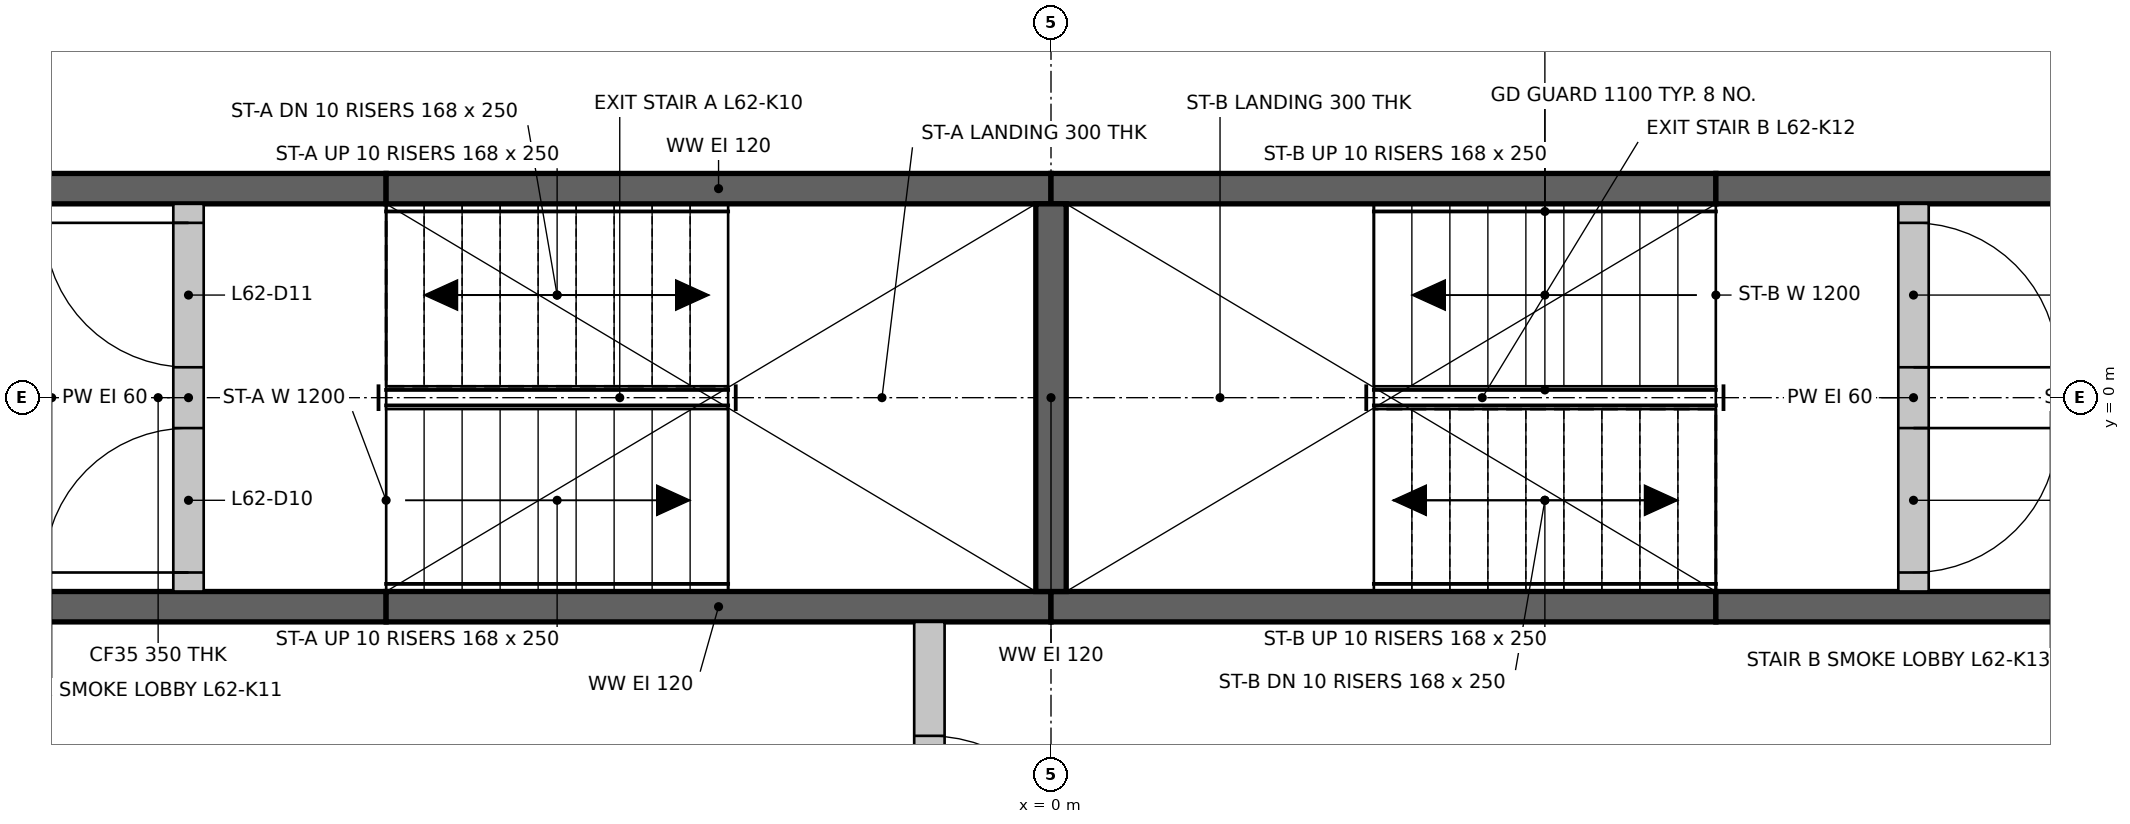
"""IFC4 building model, lengths in metres.
Left out: names, types, materials, properties, quantities, classifications, styles, units other than length and angle.
Written with IfcOpenShell. Run it as: python <this file> out.ifc"""

import sys

from ifc_helpers import new_model, si_unit, direction, frame, frame_2d, origin, place, context, subcontext, project, spatial, rectangle, extrude, element, fill, save


model = new_model("IFC4")
c1 = context("Model", 3, precision=1e-05, world=origin(), true_north=direction((0.0, 1.0)))
c2 = subcontext(c1, "Body", "Model", "MODEL_VIEW")
j1 = project(units=[si_unit("LENGTHUNIT", "METRE"), si_unit("PLANEANGLEUNIT", "RADIAN")], contexts=[c1])
p1 = place(None, origin())
s1 = spatial("IfcSite", under=j1, at=p1, CompositionType="ELEMENT")
p2 = place(p1, origin())
s2 = spatial("IfcBuilding", under=s1, at=p2, CompositionType="ELEMENT")
p3 = place(p2, frame((0.0, 0.0, 227.85)))
s3 = spatial("IfcBuildingStorey", under=s2, at=p3, CompositionType="ELEMENT", Elevation=227.85)
p4 = place(p3, frame((-7.374, -1.375, 0.0), z_axis=(0.0, 0.0, 1.0), x_axis=(1.0, 0.0, 0.0)))
e1 = element("IfcWall", 1, at=p4, inside=s3, PredefinedType="SHEAR", context=c2, shape_type="SweptSolid", body=[
    extrude(rectangle(XDim=3.0, YDim=0.2, at=frame_2d((1.5, 0.0))), origin(), (0.0, 0.0, 1.0), 3.0),
])
for number, where, z_axis, x_axis in (
    (2, (-4.374, -1.375, 0.0), (0.0, 0.0, 1.0), (1.0, 0.0, 0.0)),
    (3, (0.0, -1.375, 0.0), (0.0, 0.0, 1.0), (1.0, 0.0, 0.0)),
):
    element("IfcWall", number, at=place(p3, frame(where, z_axis=z_axis, x_axis=x_axis)), inside=s3, PredefinedType="SHEAR", context=c2, shape_type="SweptSolid", body=[
        extrude(rectangle(XDim=4.374, YDim=0.2, at=frame_2d((2.187, 0.0))), origin(), (0.0, 0.0, 1.0), 3.0),
    ])
for number, where, z_axis, x_axis in (
    (4, (4.374, -1.375, 0.0), (0.0, 0.0, 1.0), (1.0, 0.0, 0.0)),
    (5, (-7.374, 1.375, 0.0), (0.0, 0.0, 1.0), (1.0, 0.0, 0.0)),
):
    element("IfcWall", number, at=place(p3, frame(where, z_axis=z_axis, x_axis=x_axis)), inside=s3, PredefinedType="SHEAR", context=c2, shape_type="SweptSolid", body=[
        extrude(rectangle(XDim=3.0, YDim=0.2, at=frame_2d((1.5, 0.0))), origin(), (0.0, 0.0, 1.0), 3.0),
    ])
for number, where, z_axis, x_axis in (
    (6, (-4.374, 1.375, 0.0), (0.0, 0.0, 1.0), (1.0, 0.0, 0.0)),
    (7, (0.0, 1.375, 0.0), (0.0, 0.0, 1.0), (1.0, 0.0, 0.0)),
):
    element("IfcWall", number, at=place(p3, frame(where, z_axis=z_axis, x_axis=x_axis)), inside=s3, PredefinedType="SHEAR", context=c2, shape_type="SweptSolid", body=[
        extrude(rectangle(XDim=4.374, YDim=0.2, at=frame_2d((2.187, 0.0))), origin(), (0.0, 0.0, 1.0), 3.0),
    ])
p5 = place(p3, frame((4.374, 1.375, 0.0), z_axis=(0.0, 0.0, 1.0), x_axis=(1.0, 0.0, 0.0)))
e8 = element("IfcWall", 8, at=p5, inside=s3, PredefinedType="SHEAR", context=c2, shape_type="SweptSolid", body=[
    extrude(rectangle(XDim=3.0, YDim=0.2, at=frame_2d((1.5, 0.0))), origin(), (0.0, 0.0, 1.0), 3.0),
])
p6 = place(p3, frame((0.0, -1.275, 0.0), z_axis=(0.0, 0.0, 1.0), x_axis=(0.0, 1.0, 0.0)))
e9 = element("IfcWall", 9, at=p6, inside=s3, PredefinedType="SHEAR", context=c2, shape_type="SweptSolid", body=[
    extrude(rectangle(XDim=2.55, YDim=0.2, at=frame_2d((1.275, 0.0))), origin(), (0.0, 0.0, 1.0), 3.0),
])
p7 = place(p3, frame((-0.8, -3.974, 0.0), z_axis=(0.0, 0.0, 1.0), x_axis=(0.0, 1.0, 0.0)))
e10 = element("IfcWall", 10, at=p7, inside=s3, PredefinedType="PARTITIONING", context=c2, shape_type="SweptSolid", body=[
    extrude(rectangle(XDim=2.499, YDim=0.2, at=frame_2d((1.25, 0.0))), origin(), (0.0, 0.0, 1.0), 3.0),
])
p8 = place(p7, frame((0.75, 0.0, 0.0)))
e11 = element("IfcOpeningElement", 11, at=p8, cuts=e10, PredefinedType="OPENING", context=c2, shape_type="SweptSolid", body=[
    extrude(rectangle(XDim=1.0, YDim=2.1, at=frame_2d((0.5, 1.05))), frame((0.0, 0.11, 0.0), z_axis=(0.0, -1.0, 0.0), x_axis=(1.0, 0.0, 0.0)), (0.0, 0.0, 1.0), 0.22),
])
p9 = place(p3, frame((-5.674, -1.275, 0.0), z_axis=(0.0, 0.0, 1.0), x_axis=(0.0, 1.0, 0.0)))
e12 = element("IfcWall", 12, at=p9, inside=s3, PredefinedType="PARTITIONING", context=c2, shape_type="SweptSolid", body=[
    extrude(rectangle(XDim=2.55, YDim=0.2, at=frame_2d((1.275, 0.0))), origin(), (0.0, 0.0, 1.0), 3.0),
])
p10 = place(p9, frame((0.125, 0.0, 0.0)))
e13 = element("IfcOpeningElement", 13, at=p10, cuts=e12, PredefinedType="OPENING", context=c2, shape_type="SweptSolid", body=[
    extrude(rectangle(XDim=0.95, YDim=2.1, at=frame_2d((0.475, 1.05))), frame((0.0, 0.11, 0.0), z_axis=(0.0, -1.0, 0.0), x_axis=(1.0, 0.0, 0.0)), (0.0, 0.0, 1.0), 0.22),
])
p11 = place(p9, frame((1.475, 0.0, 0.0)))
e14 = element("IfcOpeningElement", 14, at=p11, cuts=e12, PredefinedType="OPENING", context=c2, shape_type="SweptSolid", body=[
    extrude(rectangle(XDim=0.95, YDim=2.1, at=frame_2d((0.475, 1.05))), frame((0.0, 0.11, 0.0), z_axis=(0.0, -1.0, 0.0), x_axis=(1.0, 0.0, 0.0)), (0.0, 0.0, 1.0), 0.22),
])
p12 = place(p3, frame((5.674, -1.275, 0.0), z_axis=(0.0, 0.0, 1.0), x_axis=(0.0, 1.0, 0.0)))
e15 = element("IfcWall", 15, at=p12, inside=s3, PredefinedType="PARTITIONING", context=c2, shape_type="SweptSolid", body=[
    extrude(rectangle(XDim=2.55, YDim=0.2, at=frame_2d((1.275, 0.0))), origin(), (0.0, 0.0, 1.0), 3.0),
])
p13 = place(p12, frame((0.125, 0.0, 0.0)))
e16 = element("IfcOpeningElement", 16, at=p13, cuts=e15, PredefinedType="OPENING", context=c2, shape_type="SweptSolid", body=[
    extrude(rectangle(XDim=0.95, YDim=2.1, at=frame_2d((0.475, 1.05))), frame((0.0, 0.11, 0.0), z_axis=(0.0, -1.0, 0.0), x_axis=(1.0, 0.0, 0.0)), (0.0, 0.0, 1.0), 0.22),
])
p14 = place(p12, frame((1.475, 0.0, 0.0)))
e17 = element("IfcOpeningElement", 17, at=p14, cuts=e15, PredefinedType="OPENING", context=c2, shape_type="SweptSolid", body=[
    extrude(rectangle(XDim=0.95, YDim=2.1, at=frame_2d((0.475, 1.05))), frame((0.0, 0.11, 0.0), z_axis=(0.0, -1.0, 0.0), x_axis=(1.0, 0.0, 0.0)), (0.0, 0.0, 1.0), 0.22),
])
p15 = place(p10, origin())
e18 = element("IfcDoor", 18, at=p15, inside=s3, OperationType="SINGLE_SWING_LEFT", PredefinedType="DOOR", context=c2, shape_type="SweptSolid", body=[
    extrude(rectangle(XDim=0.95, YDim=2.1, at=frame_2d((0.475, 1.05))), frame((0.0, 0.025, 0.0), z_axis=(0.0, -1.0, 0.0), x_axis=(1.0, 0.0, 0.0)), (0.0, 0.0, 1.0), 0.05),
])
fill(e13, e18)
p16 = place(p11, origin())
e19 = element("IfcDoor", 19, at=p16, inside=s3, OperationType="SINGLE_SWING_RIGHT", PredefinedType="DOOR", context=c2, shape_type="SweptSolid", body=[
    extrude(rectangle(XDim=0.95, YDim=2.1, at=frame_2d((0.475, 1.05))), frame((0.0, 0.025, 0.0), z_axis=(0.0, -1.0, 0.0), x_axis=(1.0, 0.0, 0.0)), (0.0, 0.0, 1.0), 0.05),
])
fill(e14, e19)
p17 = place(p13, frame((0.95, 0.0, 0.0), z_axis=(0.0, 0.0, 1.0), x_axis=(-1.0, 0.0, 0.0)))
e20 = element("IfcDoor", 20, at=p17, inside=s3, OperationType="SINGLE_SWING_RIGHT", PredefinedType="DOOR", context=c2, shape_type="SweptSolid", body=[
    extrude(rectangle(XDim=0.95, YDim=2.1, at=frame_2d((0.475, 1.05))), frame((0.0, 0.025, 0.0), z_axis=(0.0, -1.0, 0.0), x_axis=(1.0, 0.0, 0.0)), (0.0, 0.0, 1.0), 0.05),
])
fill(e16, e20)
p18 = place(p14, frame((0.95, 0.0, 0.0), z_axis=(0.0, 0.0, 1.0), x_axis=(-1.0, 0.0, 0.0)))
e21 = element("IfcDoor", 21, at=p18, inside=s3, OperationType="SINGLE_SWING_LEFT", PredefinedType="DOOR", context=c2, shape_type="SweptSolid", body=[
    extrude(rectangle(XDim=0.95, YDim=2.1, at=frame_2d((0.475, 1.05))), frame((0.0, 0.025, 0.0), z_axis=(0.0, -1.0, 0.0), x_axis=(1.0, 0.0, 0.0)), (0.0, 0.0, 1.0), 0.05),
])
fill(e17, e21)
p19 = place(p8, frame((1.0, 0.0, 0.0), z_axis=(0.0, 0.0, 1.0), x_axis=(-1.0, 0.0, 0.0)))
e22 = element("IfcDoor", 22, at=p19, inside=s3, OperationType="SINGLE_SWING_LEFT", PredefinedType="DOOR", context=c2, shape_type="SweptSolid", body=[
    extrude(rectangle(XDim=1.0, YDim=2.1, at=frame_2d((0.5, 1.05))), frame((0.0, 0.025, 0.0), z_axis=(0.0, -1.0, 0.0), x_axis=(1.0, 0.0, 0.0)), (0.0, 0.0, 1.0), 0.05),
])
fill(e11, e22)
save(model, sys.argv[1])
